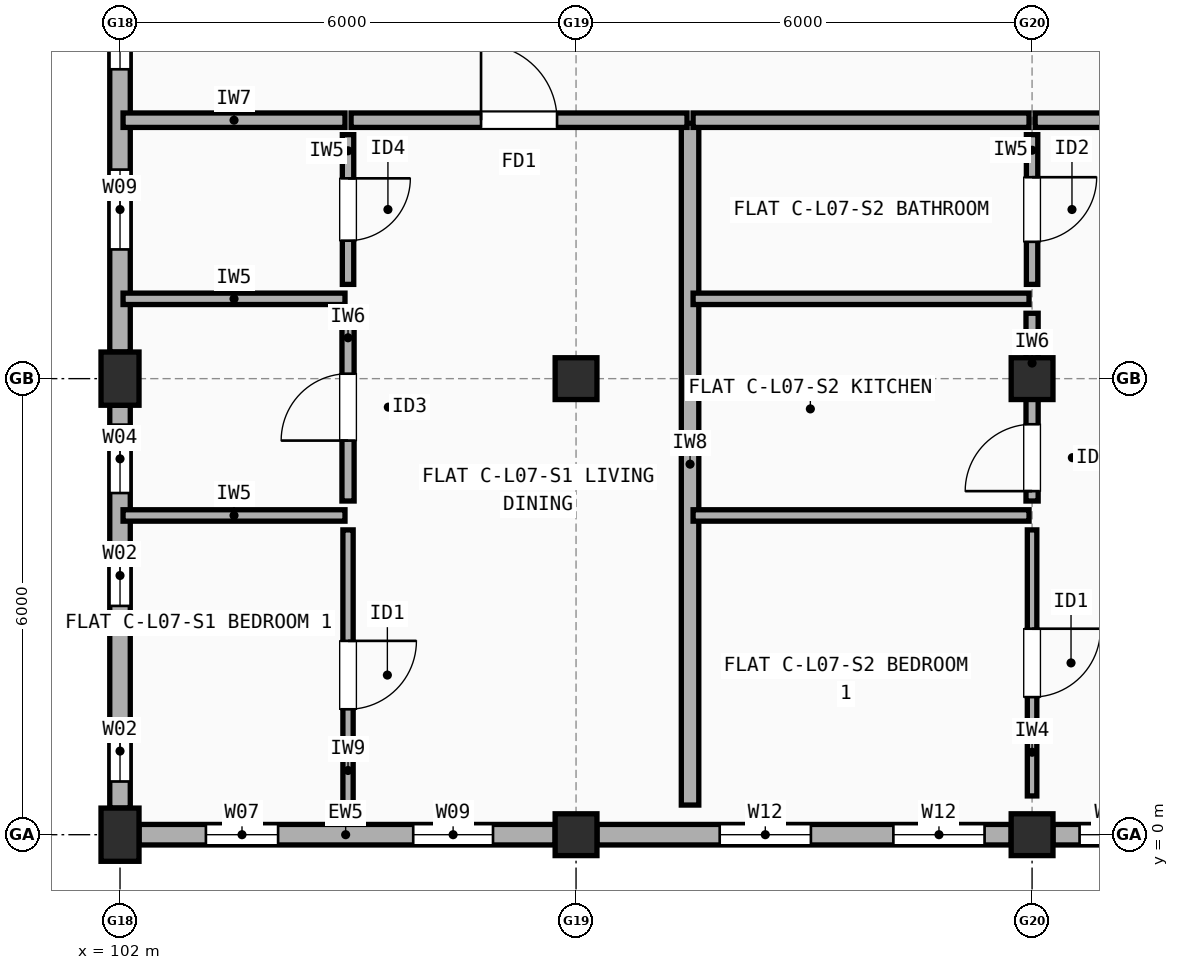
"""IFC4 building model, lengths in metres.
Left out: names, types, materials, properties, quantities, classifications, styles, units other than length and angle.
Written with IfcOpenShell. Run it as: python <this file> out.ifc"""

import sys

from ifc_helpers import new_model, si_unit, direction, frame, frame_2d, origin, origin_2d, place, context, subcontext, project, spatial, rectangle, extrude, element, fill, save


model = new_model("IFC4")
c1 = context("Model", 3, precision=1e-05, world=origin(), true_north=direction((0.0, 1.0)))
c2 = subcontext(c1, "Body", "Model", "MODEL_VIEW")
j1 = project(units=[si_unit("LENGTHUNIT", "METRE"), si_unit("PLANEANGLEUNIT", "RADIAN")], contexts=[c1])
p1 = place(None, origin())
s1 = spatial("IfcSite", under=j1, at=p1, CompositionType="ELEMENT")
p2 = place(p1, origin())
s2 = spatial("IfcBuilding", under=s1, at=p2, CompositionType="ELEMENT")
p3 = place(p2, frame((0.0, 0.0, 23.7)))
s3 = spatial("IfcBuildingStorey", under=s2, at=p3, CompositionType="ELEMENT", Elevation=23.7)
for number, where, z_axis, x_axis in (
    (1, (102.0, 0.0, 0.0), (0.0, 0.0, 1.0), (1.0, 0.0, 0.0)),
    (2, (102.0, 6.0, 0.0), (0.0, 0.0, 1.0), (1.0, 0.0, 0.0)),
):
    element("IfcColumn", number, at=place(p3, frame(where, z_axis=z_axis, x_axis=x_axis)), inside=s3, PredefinedType="COLUMN", context=c2, shape_type="SweptSolid", body=[
        extrude(rectangle(XDim=0.5, YDim=0.7, at=origin_2d()), origin(), (0.0, 0.0, 1.0), 2.975),
    ])
for number, where, z_axis, x_axis in (
    (3, (108.0, 0.0, 0.0), (0.0, 0.0, 1.0), (1.0, 0.0, 0.0)),
    (4, (108.0, 6.0, 0.0), (0.0, 0.0, 1.0), (1.0, 0.0, 0.0)),
    (5, (114.0, 0.0, 0.0), (0.0, 0.0, 1.0), (1.0, 0.0, 0.0)),
    (6, (114.0, 6.0, 0.0), (0.0, 0.0, 1.0), (1.0, 0.0, 0.0)),
):
    element("IfcColumn", number, at=place(p3, frame(where, z_axis=z_axis, x_axis=x_axis)), inside=s3, PredefinedType="COLUMN", context=c2, shape_type="SweptSolid", body=[
        extrude(rectangle(XDim=0.55, YDim=0.55, at=origin_2d()), origin(), (0.0, 0.0, 1.0), 2.975),
    ])
p4 = place(p3, frame((102.25, 0.0, 0.0), z_axis=(0.0, 0.0, 1.0), x_axis=(1.0, 0.0, 0.0)))
e7 = element("IfcWall", 7, at=p4, inside=s3, PredefinedType="STANDARD", context=c2, shape_type="SweptSolid", body=[
    extrude(rectangle(XDim=5.475, YDim=0.27, at=frame_2d((2.738, 0.0))), origin(), (0.0, 0.0, 1.0), 2.457),
])
p5 = place(p4, frame((0.88, 0.0, 0.9)))
e8 = element("IfcOpeningElement", 8, at=p5, cuts=e7, PredefinedType="OPENING", context=c2, shape_type="SweptSolid", body=[
    extrude(rectangle(XDim=0.95, YDim=1.35, at=frame_2d((0.475, 0.675))), frame((0.0, 0.145, 0.0), z_axis=(0.0, -1.0, 0.0), x_axis=(1.0, 0.0, 0.0)), (0.0, 0.0, 1.0), 0.29),
])
p6 = place(p4, frame((3.607, 0.0, 0.9)))
e9 = element("IfcOpeningElement", 9, at=p6, cuts=e7, PredefinedType="OPENING", context=c2, shape_type="SweptSolid", body=[
    extrude(rectangle(XDim=1.05, YDim=1.35, at=frame_2d((0.525, 0.675))), frame((0.0, 0.145, 0.0), z_axis=(0.0, -1.0, 0.0), x_axis=(1.0, 0.0, 0.0)), (0.0, 0.0, 1.0), 0.29),
])
p7 = place(p3, frame((108.275, 0.0, 0.0), z_axis=(0.0, 0.0, 1.0), x_axis=(1.0, 0.0, 0.0)))
e10 = element("IfcWall", 10, at=p7, inside=s3, PredefinedType="STANDARD", context=c2, shape_type="SweptSolid", body=[
    extrude(rectangle(XDim=5.45, YDim=0.27, at=frame_2d((2.725, 0.0))), origin(), (0.0, 0.0, 1.0), 2.457),
])
p8 = place(p7, frame((1.615, 0.0, 0.9)))
e11 = element("IfcOpeningElement", 11, at=p8, cuts=e10, PredefinedType="OPENING", context=c2, shape_type="SweptSolid", body=[
    extrude(rectangle(XDim=1.2, YDim=1.35, at=frame_2d((0.6, 0.675))), frame((0.0, 0.145, 0.0), z_axis=(0.0, -1.0, 0.0), x_axis=(1.0, 0.0, 0.0)), (0.0, 0.0, 1.0), 0.29),
])
p9 = place(p7, frame((3.9, 0.0, 0.9)))
e12 = element("IfcOpeningElement", 12, at=p9, cuts=e10, PredefinedType="OPENING", context=c2, shape_type="SweptSolid", body=[
    extrude(rectangle(XDim=1.2, YDim=1.35, at=frame_2d((0.6, 0.675))), frame((0.0, 0.145, 0.0), z_axis=(0.0, -1.0, 0.0), x_axis=(1.0, 0.0, 0.0)), (0.0, 0.0, 1.0), 0.29),
])
p10 = place(p3, frame((114.275, 0.0, 0.0), z_axis=(0.0, 0.0, 1.0), x_axis=(1.0, 0.0, 0.0)))
e13 = element("IfcWall", 13, at=p10, inside=s3, PredefinedType="STANDARD", context=c2, shape_type="SweptSolid", body=[
    extrude(rectangle(XDim=5.45, YDim=0.27, at=frame_2d((2.725, 0.0))), origin(), (0.0, 0.0, 1.0), 2.457),
])
p11 = place(p10, frame((0.35, 0.0, 0.9)))
e14 = element("IfcOpeningElement", 14, at=p11, cuts=e13, PredefinedType="OPENING", context=c2, shape_type="SweptSolid", body=[
    extrude(rectangle(XDim=0.85, YDim=1.25, at=frame_2d((0.425, 0.625))), frame((0.0, 0.145, 0.0), z_axis=(0.0, -1.0, 0.0), x_axis=(1.0, 0.0, 0.0)), (0.0, 0.0, 1.0), 0.29),
])
p12 = place(p10, frame((4.25, 0.0, 0.9)))
e15 = element("IfcOpeningElement", 15, at=p12, cuts=e13, PredefinedType="OPENING", context=c2, shape_type="SweptSolid", body=[
    extrude(rectangle(XDim=0.85, YDim=1.25, at=frame_2d((0.425, 0.625))), frame((0.0, 0.145, 0.0), z_axis=(0.0, -1.0, 0.0), x_axis=(1.0, 0.0, 0.0)), (0.0, 0.0, 1.0), 0.29),
])
p13 = place(p3, frame((102.0, 11.65, 0.0), z_axis=(0.0, 0.0, 1.0), x_axis=(0.0, -1.0, 0.0)))
e16 = element("IfcWall", 16, at=p13, inside=s3, PredefinedType="STANDARD", context=c2, shape_type="SweptSolid", body=[
    extrude(rectangle(XDim=5.3, YDim=0.27, at=frame_2d((2.65, 0.0))), origin(), (0.0, 0.0, 1.0), 2.457),
])
p14 = place(p13, frame((0.63, 0.0, 0.9)))
e17 = element("IfcOpeningElement", 17, at=p14, cuts=e16, PredefinedType="OPENING", context=c2, shape_type="SweptSolid", body=[
    extrude(rectangle(XDim=0.95, YDim=1.35, at=frame_2d((0.475, 0.675))), frame((0.0, 0.145, 0.0), z_axis=(0.0, -1.0, 0.0), x_axis=(1.0, 0.0, 0.0)), (0.0, 0.0, 1.0), 0.29),
])
p15 = place(p13, frame((2.9, 0.0, 0.9)))
e18 = element("IfcOpeningElement", 18, at=p15, cuts=e16, PredefinedType="OPENING", context=c2, shape_type="SweptSolid", body=[
    extrude(rectangle(XDim=1.05, YDim=1.35, at=frame_2d((0.525, 0.675))), frame((0.0, 0.145, 0.0), z_axis=(0.0, -1.0, 0.0), x_axis=(1.0, 0.0, 0.0)), (0.0, 0.0, 1.0), 0.29),
])
p16 = place(p3, frame((102.0, 5.65, 0.0), z_axis=(0.0, 0.0, 1.0), x_axis=(0.0, -1.0, 0.0)))
e19 = element("IfcWall", 19, at=p16, inside=s3, PredefinedType="STANDARD", context=c2, shape_type="SweptSolid", body=[
    extrude(rectangle(XDim=5.3, YDim=0.27, at=frame_2d((2.65, 0.0))), origin(), (0.0, 0.0, 1.0), 2.457),
])
p17 = place(p16, frame((0.255, 0.0, 0.9)))
e20 = element("IfcOpeningElement", 20, at=p17, cuts=e19, PredefinedType="OPENING", context=c2, shape_type="SweptSolid", body=[
    extrude(rectangle(XDim=0.9, YDim=1.3, at=frame_2d((0.45, 0.65))), frame((0.0, 0.145, 0.0), z_axis=(0.0, -1.0, 0.0), x_axis=(1.0, 0.0, 0.0)), (0.0, 0.0, 1.0), 0.29),
])
p18 = place(p16, frame((1.84, 0.0, 0.9)))
e21 = element("IfcOpeningElement", 21, at=p18, cuts=e19, PredefinedType="OPENING", context=c2, shape_type="SweptSolid", body=[
    extrude(rectangle(XDim=0.8, YDim=1.2, at=frame_2d((0.4, 0.6))), frame((0.0, 0.145, 0.0), z_axis=(0.0, -1.0, 0.0), x_axis=(1.0, 0.0, 0.0)), (0.0, 0.0, 1.0), 0.29),
])
p19 = place(p16, frame((4.15, 0.0, 0.9)))
e22 = element("IfcOpeningElement", 22, at=p19, cuts=e19, PredefinedType="OPENING", context=c2, shape_type="SweptSolid", body=[
    extrude(rectangle(XDim=0.8, YDim=1.2, at=frame_2d((0.4, 0.6))), frame((0.0, 0.145, 0.0), z_axis=(0.0, -1.0, 0.0), x_axis=(1.0, 0.0, 0.0)), (0.0, 0.0, 1.0), 0.29),
])
p20 = place(p3, frame((109.5, 0.39, 0.0), z_axis=(0.0, 0.0, 1.0), x_axis=(0.0, 1.0, 0.0)))
e23 = element("IfcWall", 23, at=p20, inside=s3, PredefinedType="SOLIDWALL", context=c2, shape_type="SweptSolid", body=[
    extrude(rectangle(XDim=8.97, YDim=0.23, at=frame_2d((4.485, 0.0))), origin(), (0.0, 0.0, 1.0), 2.457),
])
p21 = place(p3, frame((102.04, 9.4, 0.0), z_axis=(0.0, 0.0, 1.0), x_axis=(1.0, 0.0, 0.0)))
e24 = element("IfcWall", 24, at=p21, inside=s3, PredefinedType="SOLIDWALL", context=c2, shape_type="SweptSolid", body=[
    extrude(rectangle(XDim=2.92, YDim=0.19, at=frame_2d((1.46, 0.0))), origin(), (0.0, 0.0, 1.0), 2.457),
])
p22 = place(p3, frame((105.04, 9.4, 0.0), z_axis=(0.0, 0.0, 1.0), x_axis=(1.0, 0.0, 0.0)))
e25 = element("IfcWall", 25, at=p22, inside=s3, PredefinedType="SOLIDWALL", context=c2, shape_type="SweptSolid", body=[
    extrude(rectangle(XDim=4.42, YDim=0.19, at=frame_2d((2.21, 0.0))), origin(), (0.0, 0.0, 1.0), 2.458),
])
p23 = place(p22, frame((1.71, 0.0, 0.0)))
e26 = element("IfcOpeningElement", 26, at=p23, cuts=e25, PredefinedType="OPENING", context=c2, shape_type="SweptSolid", body=[
    extrude(rectangle(XDim=1.0, YDim=2.15, at=frame_2d((0.5, 1.075))), frame((0.0, 0.105, 0.0), z_axis=(0.0, -1.0, 0.0), x_axis=(1.0, 0.0, 0.0)), (0.0, 0.0, 1.0), 0.21),
])
p24 = place(p3, frame((105.0, 0.19, 0.0), z_axis=(0.0, 0.0, 1.0), x_axis=(0.0, 1.0, 0.0)))
e27 = element("IfcWall", 27, at=p24, inside=s3, PredefinedType="PARTITIONING", context=c2, shape_type="SweptSolid", body=[
    extrude(rectangle(XDim=3.82, YDim=0.135, at=frame_2d((1.91, 0.0))), origin(), (0.0, 0.0, 1.0), 2.975),
])
p25 = place(p24, frame((1.46, 0.0, 0.0)))
e28 = element("IfcOpeningElement", 28, at=p25, cuts=e27, PredefinedType="OPENING", context=c2, shape_type="SweptSolid", body=[
    extrude(rectangle(XDim=0.9, YDim=2.1, at=frame_2d((0.45, 1.05))), frame((0.0, 0.077, 0.0), z_axis=(0.0, -1.0, 0.0), x_axis=(1.0, 0.0, 0.0)), (0.0, 0.0, 1.0), 0.155),
])
p26 = place(p3, frame((105.0, 4.39, 0.0), z_axis=(0.0, 0.0, 1.0), x_axis=(0.0, 1.0, 0.0)))
e29 = element("IfcWall", 29, at=p26, inside=s3, PredefinedType="PLUMBINGWALL", context=c2, shape_type="SweptSolid", body=[
    extrude(rectangle(XDim=2.47, YDim=0.16, at=frame_2d((1.235, 0.0))), origin(), (0.0, 0.0, 1.0), 2.457),
])
p27 = place(p26, frame((0.795, 0.0, 0.0)))
e30 = element("IfcOpeningElement", 30, at=p27, cuts=e29, PredefinedType="OPENING", context=c2, shape_type="SweptSolid", body=[
    extrude(rectangle(XDim=0.88, YDim=2.1, at=frame_2d((0.44, 1.05))), frame((0.0, 0.09, 0.0), z_axis=(0.0, -1.0, 0.0), x_axis=(1.0, 0.0, 0.0)), (0.0, 0.0, 1.0), 0.18),
])
p28 = place(p3, frame((105.0, 7.24, 0.0), z_axis=(0.0, 0.0, 1.0), x_axis=(0.0, 1.0, 0.0)))
e31 = element("IfcWall", 31, at=p28, inside=s3, PredefinedType="PARTITIONING", context=c2, shape_type="SweptSolid", body=[
    extrude(rectangle(XDim=1.97, YDim=0.15, at=frame_2d((0.985, 0.0))), origin(), (0.0, 0.0, 1.0), 2.975),
])
p29 = place(p28, frame((0.575, 0.0, 0.0)))
e32 = element("IfcOpeningElement", 32, at=p29, cuts=e31, PredefinedType="OPENING", context=c2, shape_type="SweptSolid", body=[
    extrude(rectangle(XDim=0.82, YDim=2.08, at=frame_2d((0.41, 1.04))), frame((0.0, 0.085, 0.0), z_axis=(0.0, -1.0, 0.0), x_axis=(1.0, 0.0, 0.0)), (0.0, 0.0, 1.0), 0.17),
])
for number, where, z_axis, x_axis in (
    (33, (102.04, 4.2, 0.0), (0.0, 0.0, 1.0), (1.0, 0.0, 0.0)),
    (34, (102.04, 7.05, 0.0), (0.0, 0.0, 1.0), (1.0, 0.0, 0.0)),
):
    element("IfcWall", number, at=place(p3, frame(where, z_axis=z_axis, x_axis=x_axis)), inside=s3, PredefinedType="PARTITIONING", context=c2, shape_type="SweptSolid", body=[
        extrude(rectangle(XDim=2.92, YDim=0.15, at=frame_2d((1.46, 0.0))), origin(), (0.0, 0.0, 1.0), 2.457),
    ])
p30 = place(p3, frame((109.54, 9.4, 0.0), z_axis=(0.0, 0.0, 1.0), x_axis=(1.0, 0.0, 0.0)))
e35 = element("IfcWall", 35, at=p30, inside=s3, PredefinedType="SOLIDWALL", context=c2, shape_type="SweptSolid", body=[
    extrude(rectangle(XDim=4.42, YDim=0.19, at=frame_2d((2.21, 0.0))), origin(), (0.0, 0.0, 1.0), 2.458),
])
p31 = place(p3, frame((114.04, 9.4, 0.0), z_axis=(0.0, 0.0, 1.0), x_axis=(1.0, 0.0, 0.0)))
e36 = element("IfcWall", 36, at=p31, inside=s3, PredefinedType="SOLIDWALL", context=c2, shape_type="SweptSolid", body=[
    extrude(rectangle(XDim=5.92, YDim=0.19, at=frame_2d((2.96, 0.0))), origin(), (0.0, 0.0, 1.0), 2.458),
])
p32 = place(p31, frame((2.47, 0.0, 0.0)))
e37 = element("IfcOpeningElement", 37, at=p32, cuts=e36, PredefinedType="OPENING", context=c2, shape_type="SweptSolid", body=[
    extrude(rectangle(XDim=0.98, YDim=2.15, at=frame_2d((0.49, 1.075))), frame((0.0, 0.105, 0.0), z_axis=(0.0, -1.0, 0.0), x_axis=(1.0, 0.0, 0.0)), (0.0, 0.0, 1.0), 0.21),
])
p33 = place(p3, frame((114.0, 0.51, 0.0), z_axis=(0.0, 0.0, 1.0), x_axis=(0.0, 1.0, 0.0)))
e38 = element("IfcWall", 38, at=p33, inside=s3, PredefinedType="PARTITIONING", context=c2, shape_type="SweptSolid", body=[
    extrude(rectangle(XDim=3.5, YDim=0.125, at=frame_2d((1.75, 0.0))), origin(), (0.0, 0.0, 1.0), 2.508),
])
p34 = place(p33, frame((1.3, 0.0, 0.0)))
e39 = element("IfcOpeningElement", 39, at=p34, cuts=e38, PredefinedType="OPENING", context=c2, shape_type="SweptSolid", body=[
    extrude(rectangle(XDim=0.9, YDim=2.1, at=frame_2d((0.45, 1.05))), frame((0.0, 0.073, 0.0), z_axis=(0.0, -1.0, 0.0), x_axis=(1.0, 0.0, 0.0)), (0.0, 0.0, 1.0), 0.145),
])
p35 = place(p3, frame((114.0, 4.39, 0.0), z_axis=(0.0, 0.0, 1.0), x_axis=(0.0, 1.0, 0.0)))
e40 = element("IfcWall", 40, at=p35, inside=s3, PredefinedType="PLUMBINGWALL", context=c2, shape_type="SweptSolid", body=[
    extrude(rectangle(XDim=2.47, YDim=0.16, at=frame_2d((1.235, 0.0))), origin(), (0.0, 0.0, 1.0), 2.458),
])
p36 = place(p35, frame((0.13, 0.0, 0.0)))
e41 = element("IfcOpeningElement", 41, at=p36, cuts=e40, PredefinedType="OPENING", context=c2, shape_type="SweptSolid", body=[
    extrude(rectangle(XDim=0.88, YDim=2.1, at=frame_2d((0.44, 1.05))), frame((0.0, 0.09, 0.0), z_axis=(0.0, -1.0, 0.0), x_axis=(1.0, 0.0, 0.0)), (0.0, 0.0, 1.0), 0.18),
])
p37 = place(p3, frame((114.0, 7.24, 0.0), z_axis=(0.0, 0.0, 1.0), x_axis=(0.0, 1.0, 0.0)))
e42 = element("IfcWall", 42, at=p37, inside=s3, PredefinedType="PARTITIONING", context=c2, shape_type="SweptSolid", body=[
    extrude(rectangle(XDim=1.97, YDim=0.15, at=frame_2d((0.985, 0.0))), origin(), (0.0, 0.0, 1.0), 2.458),
])
p38 = place(p37, frame((0.56, 0.0, 0.0)))
e43 = element("IfcOpeningElement", 43, at=p38, cuts=e42, PredefinedType="OPENING", context=c2, shape_type="SweptSolid", body=[
    extrude(rectangle(XDim=0.85, YDim=2.1, at=frame_2d((0.425, 1.05))), frame((0.0, 0.085, 0.0), z_axis=(0.0, -1.0, 0.0), x_axis=(1.0, 0.0, 0.0)), (0.0, 0.0, 1.0), 0.17),
])
p39 = place(p3, frame((109.54, 4.2, 0.0), z_axis=(0.0, 0.0, 1.0), x_axis=(1.0, 0.0, 0.0)))
e44 = element("IfcWall", 44, at=p39, inside=s3, PredefinedType="PARTITIONING", context=c2, shape_type="SweptSolid", body=[
    extrude(rectangle(XDim=4.42, YDim=0.15, at=frame_2d((2.21, 0.0))), origin(), (0.0, 0.0, 1.0), 2.508),
])
p40 = place(p3, frame((109.54, 7.05, 0.0), z_axis=(0.0, 0.0, 1.0), x_axis=(1.0, 0.0, 0.0)))
e45 = element("IfcWall", 45, at=p40, inside=s3, PredefinedType="PARTITIONING", context=c2, shape_type="SweptSolid", body=[
    extrude(rectangle(XDim=4.42, YDim=0.15, at=frame_2d((2.21, 0.0))), origin(), (0.0, 0.0, 1.0), 2.458),
])
p41 = place(p5, origin())
e46 = element("IfcWindow", 46, at=p41, inside=s3, PartitioningType="SINGLE_PANEL", PredefinedType="WINDOW", context=c2, shape_type="SweptSolid", body=[
    extrude(rectangle(XDim=0.95, YDim=1.35, at=frame_2d((0.475, 0.675))), frame((0.0, 0.03, 0.0), z_axis=(0.0, -1.0, 0.0), x_axis=(1.0, 0.0, 0.0)), (0.0, 0.0, 1.0), 0.06),
])
fill(e8, e46)
p42 = place(p6, origin())
e47 = element("IfcWindow", 47, at=p42, inside=s3, PartitioningType="SINGLE_PANEL", PredefinedType="WINDOW", context=c2, shape_type="SweptSolid", body=[
    extrude(rectangle(XDim=1.05, YDim=1.35, at=frame_2d((0.525, 0.675))), frame((0.0, 0.03, 0.0), z_axis=(0.0, -1.0, 0.0), x_axis=(1.0, 0.0, 0.0)), (0.0, 0.0, 1.0), 0.06),
])
fill(e9, e47)
p43 = place(p8, origin())
e48 = element("IfcWindow", 48, at=p43, inside=s3, PartitioningType="SINGLE_PANEL", PredefinedType="WINDOW", context=c2, shape_type="SweptSolid", body=[
    extrude(rectangle(XDim=1.2, YDim=1.35, at=frame_2d((0.6, 0.675))), frame((0.0, 0.03, 0.0), z_axis=(0.0, -1.0, 0.0), x_axis=(1.0, 0.0, 0.0)), (0.0, 0.0, 1.0), 0.06),
])
fill(e11, e48)
p44 = place(p9, origin())
e49 = element("IfcWindow", 49, at=p44, inside=s3, PartitioningType="SINGLE_PANEL", PredefinedType="WINDOW", context=c2, shape_type="SweptSolid", body=[
    extrude(rectangle(XDim=1.2, YDim=1.35, at=frame_2d((0.6, 0.675))), frame((0.0, 0.03, 0.0), z_axis=(0.0, -1.0, 0.0), x_axis=(1.0, 0.0, 0.0)), (0.0, 0.0, 1.0), 0.06),
])
fill(e12, e49)
p45 = place(p11, origin())
e50 = element("IfcWindow", 50, at=p45, inside=s3, PartitioningType="SINGLE_PANEL", PredefinedType="WINDOW", context=c2, shape_type="SweptSolid", body=[
    extrude(rectangle(XDim=0.85, YDim=1.25, at=frame_2d((0.425, 0.625))), frame((0.0, 0.03, 0.0), z_axis=(0.0, -1.0, 0.0), x_axis=(1.0, 0.0, 0.0)), (0.0, 0.0, 1.0), 0.06),
])
fill(e14, e50)
p46 = place(p14, origin())
e51 = element("IfcWindow", 51, at=p46, inside=s3, PartitioningType="SINGLE_PANEL", PredefinedType="WINDOW", context=c2, shape_type="SweptSolid", body=[
    extrude(rectangle(XDim=0.95, YDim=1.35, at=frame_2d((0.475, 0.675))), frame((0.0, 0.03, 0.0), z_axis=(0.0, -1.0, 0.0), x_axis=(1.0, 0.0, 0.0)), (0.0, 0.0, 1.0), 0.06),
])
fill(e17, e51)
p47 = place(p15, origin())
e52 = element("IfcWindow", 52, at=p47, inside=s3, PartitioningType="SINGLE_PANEL", PredefinedType="WINDOW", context=c2, shape_type="SweptSolid", body=[
    extrude(rectangle(XDim=1.05, YDim=1.35, at=frame_2d((0.525, 0.675))), frame((0.0, 0.03, 0.0), z_axis=(0.0, -1.0, 0.0), x_axis=(1.0, 0.0, 0.0)), (0.0, 0.0, 1.0), 0.06),
])
fill(e18, e52)
p48 = place(p17, origin())
e53 = element("IfcWindow", 53, at=p48, inside=s3, PartitioningType="SINGLE_PANEL", PredefinedType="WINDOW", context=c2, shape_type="SweptSolid", body=[
    extrude(rectangle(XDim=0.9, YDim=1.3, at=frame_2d((0.45, 0.65))), frame((0.0, 0.03, 0.0), z_axis=(0.0, -1.0, 0.0), x_axis=(1.0, 0.0, 0.0)), (0.0, 0.0, 1.0), 0.06),
])
fill(e20, e53)
p49 = place(p18, origin())
e54 = element("IfcWindow", 54, at=p49, inside=s3, PartitioningType="SINGLE_PANEL", PredefinedType="WINDOW", context=c2, shape_type="SweptSolid", body=[
    extrude(rectangle(XDim=0.8, YDim=1.2, at=frame_2d((0.4, 0.6))), frame((0.0, 0.03, 0.0), z_axis=(0.0, -1.0, 0.0), x_axis=(1.0, 0.0, 0.0)), (0.0, 0.0, 1.0), 0.06),
])
fill(e21, e54)
p50 = place(p19, origin())
e55 = element("IfcWindow", 55, at=p50, inside=s3, PartitioningType="SINGLE_PANEL", PredefinedType="WINDOW", context=c2, shape_type="SweptSolid", body=[
    extrude(rectangle(XDim=0.8, YDim=1.2, at=frame_2d((0.4, 0.6))), frame((0.0, 0.03, 0.0), z_axis=(0.0, -1.0, 0.0), x_axis=(1.0, 0.0, 0.0)), (0.0, 0.0, 1.0), 0.06),
])
fill(e22, e55)
p51 = place(p23, origin())
e56 = element("IfcDoor", 56, at=p51, inside=s3, OperationType="SINGLE_SWING_LEFT", PredefinedType="DOOR", context=c2, shape_type="SweptSolid", body=[
    extrude(rectangle(XDim=1.0, YDim=2.15, at=frame_2d((0.5, 1.075))), frame((0.0, 0.025, 0.0), z_axis=(0.0, -1.0, 0.0), x_axis=(1.0, 0.0, 0.0)), (0.0, 0.0, 1.0), 0.05),
])
fill(e26, e56)
p52 = place(p25, origin())
e57 = element("IfcDoor", 57, at=p52, inside=s3, OperationType="SINGLE_SWING_RIGHT", PredefinedType="DOOR", context=c2, shape_type="SweptSolid", body=[
    extrude(rectangle(XDim=0.9, YDim=2.1, at=frame_2d((0.45, 1.05))), frame((0.0, 0.025, 0.0), z_axis=(0.0, -1.0, 0.0), x_axis=(1.0, 0.0, 0.0)), (0.0, 0.0, 1.0), 0.05),
])
fill(e28, e57)
p53 = place(p27, origin())
e58 = element("IfcDoor", 58, at=p53, inside=s3, OperationType="SINGLE_SWING_LEFT", PredefinedType="DOOR", context=c2, shape_type="SweptSolid", body=[
    extrude(rectangle(XDim=0.88, YDim=2.1, at=frame_2d((0.44, 1.05))), frame((0.0, 0.025, 0.0), z_axis=(0.0, -1.0, 0.0), x_axis=(1.0, 0.0, 0.0)), (0.0, 0.0, 1.0), 0.05),
])
fill(e30, e58)
p54 = place(p29, origin())
e59 = element("IfcDoor", 59, at=p54, inside=s3, OperationType="SINGLE_SWING_RIGHT", PredefinedType="DOOR", context=c2, shape_type="SweptSolid", body=[
    extrude(rectangle(XDim=0.82, YDim=2.08, at=frame_2d((0.41, 1.04))), frame((0.0, 0.025, 0.0), z_axis=(0.0, -1.0, 0.0), x_axis=(1.0, 0.0, 0.0)), (0.0, 0.0, 1.0), 0.05),
])
fill(e32, e59)
p55 = place(p34, origin())
e60 = element("IfcDoor", 60, at=p55, inside=s3, OperationType="SINGLE_SWING_RIGHT", PredefinedType="DOOR", context=c2, shape_type="SweptSolid", body=[
    extrude(rectangle(XDim=0.9, YDim=2.1, at=frame_2d((0.45, 1.05))), frame((0.0, 0.025, 0.0), z_axis=(0.0, -1.0, 0.0), x_axis=(1.0, 0.0, 0.0)), (0.0, 0.0, 1.0), 0.05),
])
fill(e39, e60)
p56 = place(p36, origin())
e61 = element("IfcDoor", 61, at=p56, inside=s3, OperationType="SINGLE_SWING_LEFT", PredefinedType="DOOR", context=c2, shape_type="SweptSolid", body=[
    extrude(rectangle(XDim=0.88, YDim=2.1, at=frame_2d((0.44, 1.05))), frame((0.0, 0.025, 0.0), z_axis=(0.0, -1.0, 0.0), x_axis=(1.0, 0.0, 0.0)), (0.0, 0.0, 1.0), 0.05),
])
fill(e41, e61)
p57 = place(p38, origin())
e62 = element("IfcDoor", 62, at=p57, inside=s3, OperationType="SINGLE_SWING_RIGHT", PredefinedType="DOOR", context=c2, shape_type="SweptSolid", body=[
    extrude(rectangle(XDim=0.85, YDim=2.1, at=frame_2d((0.425, 1.05))), frame((0.0, 0.025, 0.0), z_axis=(0.0, -1.0, 0.0), x_axis=(1.0, 0.0, 0.0)), (0.0, 0.0, 1.0), 0.05),
])
fill(e43, e62)
save(model, sys.argv[1])
